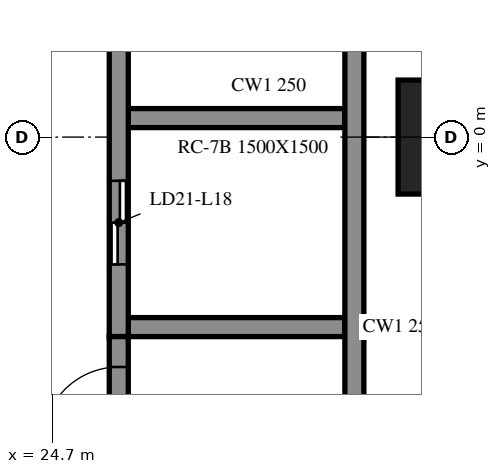
"""IFC4 building model, lengths in metres.
Left out: names, types, materials, properties, quantities, classifications, styles, units other than length and angle.
Written with IfcOpenShell. Run it as: python <this file> out.ifc"""

import sys

from ifc_helpers import new_model, si_unit, direction, frame, frame_2d, origin, origin_2d, place, context, subcontext, project, spatial, rectangle, extrude, element, fill, save


model = new_model("IFC4")
c1 = context("Model", 3, precision=1e-05, world=origin(), true_north=direction((0.0, 1.0)))
c2 = subcontext(c1, "Body", "Model", "MODEL_VIEW")
j1 = project(units=[si_unit("LENGTHUNIT", "METRE"), si_unit("PLANEANGLEUNIT", "RADIAN")], contexts=[c1])
p1 = place(None, origin())
s1 = spatial("IfcSite", under=j1, at=p1, CompositionType="ELEMENT")
p2 = place(p1, origin())
s2 = spatial("IfcBuilding", under=s1, at=p2, CompositionType="ELEMENT")
p3 = place(p2, frame((0.0, 0.0, 80.4)))
s3 = spatial("IfcBuildingStorey", under=s2, at=p3, CompositionType="ELEMENT", Elevation=80.4)
p4 = place(p3, frame((30.0, 0.0, -0.55), z_axis=(0.0, 0.0, 1.0), x_axis=(1.0, 0.0, 0.0)))
e1 = element("IfcColumn", 1, at=p4, inside=s3, PredefinedType="COLUMN", context=c2, shape_type="SweptSolid", body=[
    extrude(rectangle(XDim=1.5, YDim=1.5, at=origin_2d()), origin(), (0.0, 0.0, 1.0), 4.61),
])
p5 = place(p3, frame((28.675, -9.125, 0.0), z_axis=(0.0, 0.0, 1.0), x_axis=(0.0, 1.0, 0.0)))
e2 = element("IfcWall", 2, at=p5, inside=s3, PredefinedType="SOLIDWALL", context=c2, shape_type="SweptSolid", body=[
    extrude(rectangle(XDim=24.25, YDim=0.25, at=frame_2d((12.125, 0.0))), origin(), (0.0, 0.0, 1.0), 4.06),
])
p6 = place(p5, frame((14.425, 0.0, 0.0)))
e3 = element("IfcOpeningElement", 3, at=p6, cuts=e2, PredefinedType="OPENING", context=c2, shape_type="SweptSolid", body=[
    extrude(rectangle(XDim=0.9, YDim=2.1, at=frame_2d((0.45, 1.05))), frame((0.0, 0.135, 0.0), z_axis=(0.0, -1.0, 0.0), x_axis=(1.0, 0.0, 0.0)), (0.0, 0.0, 1.0), 0.27),
])
p7 = place(p5, frame((18.975, 0.0, 0.0)))
e4 = element("IfcOpeningElement", 4, at=p7, cuts=e2, PredefinedType="OPENING", context=c2, shape_type="SweptSolid", body=[
    extrude(rectangle(XDim=0.9, YDim=2.1, at=frame_2d((0.45, 1.05))), frame((0.0, 0.135, 0.0), z_axis=(0.0, -1.0, 0.0), x_axis=(1.0, 0.0, 0.0)), (0.0, 0.0, 1.0), 0.27),
])
p8 = place(p5, frame((21.396, 0.0, 0.0)))
e5 = element("IfcOpeningElement", 5, at=p8, cuts=e2, PredefinedType="OPENING", context=c2, shape_type="SweptSolid", body=[
    extrude(rectangle(XDim=0.9, YDim=2.1, at=frame_2d((0.45, 1.05))), frame((0.0, 0.135, 0.0), z_axis=(0.0, -1.0, 0.0), x_axis=(1.0, 0.0, 0.0)), (0.0, 0.0, 1.0), 0.27),
])
p9 = place(p3, frame((25.575, -8.875, 0.0), z_axis=(0.0, 0.0, 1.0), x_axis=(0.0, 1.0, 0.0)))
e6 = element("IfcWall", 6, at=p9, inside=s3, PredefinedType="SOLIDWALL", context=c2, shape_type="SweptSolid", body=[
    extrude(rectangle(XDim=6.25, YDim=0.25, at=frame_2d((3.125, 0.0))), origin(), (0.0, 0.0, 1.0), 4.06),
])
p10 = place(p9, frame((4.85, 0.0, 0.0)))
e7 = element("IfcOpeningElement", 7, at=p10, cuts=e6, PredefinedType="OPENING", context=c2, shape_type="SweptSolid", body=[
    extrude(rectangle(XDim=1.0, YDim=2.1, at=frame_2d((0.5, 1.05))), frame((0.0, 0.135, 0.0), z_axis=(0.0, -1.0, 0.0), x_axis=(1.0, 0.0, 0.0)), (0.0, 0.0, 1.0), 0.27),
])
p11 = place(p3, frame((25.575, 14.875, 0.0), z_axis=(0.0, 0.0, 1.0), x_axis=(0.0, -1.0, 0.0)))
e8 = element("IfcWall", 8, at=p11, inside=s3, PredefinedType="SOLIDWALL", context=c2, shape_type="SweptSolid", body=[
    extrude(rectangle(XDim=17.5, YDim=0.25, at=frame_2d((8.75, 0.0))), origin(), (0.0, 0.0, 1.0), 4.06),
])
p12 = place(p11, frame((15.45, 0.0, 0.0)))
e9 = element("IfcOpeningElement", 9, at=p12, cuts=e8, PredefinedType="OPENING", context=c2, shape_type="SweptSolid", body=[
    extrude(rectangle(XDim=1.1, YDim=2.1, at=frame_2d((0.55, 1.05))), frame((0.0, 0.135, 0.0), z_axis=(0.0, -1.0, 0.0), x_axis=(1.0, 0.0, 0.0)), (0.0, 0.0, 1.0), 0.27),
])
p13 = place(p11, frame((12.8, 0.0, 0.0)))
e10 = element("IfcOpeningElement", 10, at=p13, cuts=e8, PredefinedType="OPENING", context=c2, shape_type="SweptSolid", body=[
    extrude(rectangle(XDim=0.9, YDim=2.1, at=frame_2d((0.45, 1.05))), frame((0.0, 0.135, 0.0), z_axis=(0.0, -1.0, 0.0), x_axis=(1.0, 0.0, 0.0)), (0.0, 0.0, 1.0), 0.27),
])
for number, where, z_axis, x_axis in (
    (11, (25.7, -2.5, 0.0), (0.0, 0.0, 1.0), (1.0, 0.0, 0.0)),
    (12, (25.7, 0.25, 0.0), (0.0, 0.0, 1.0), (1.0, 0.0, 0.0)),
):
    element("IfcWall", number, at=place(p3, frame(where, z_axis=z_axis, x_axis=x_axis)), inside=s3, PredefinedType="SOLIDWALL", context=c2, shape_type="SweptSolid", body=[
        extrude(rectangle(XDim=2.85, YDim=0.25, at=frame_2d((1.425, 0.0))), origin(), (0.0, 0.0, 1.0), 4.06),
    ])
p14 = place(p12, origin())
e13 = element("IfcDoor", 13, at=p14, inside=s3, OperationType="DOUBLE_DOOR_SLIDING", PredefinedType="DOOR", context=c2, shape_type="SweptSolid", body=[
    extrude(rectangle(XDim=1.1, YDim=2.1, at=frame_2d((0.55, 1.05))), frame((0.0, 0.025, 0.0), z_axis=(0.0, -1.0, 0.0), x_axis=(1.0, 0.0, 0.0)), (0.0, 0.0, 1.0), 0.05),
])
fill(e9, e13)
p15 = place(p10, origin())
e14 = element("IfcDoor", 14, at=p15, inside=s3, OperationType="SINGLE_SWING_RIGHT", PredefinedType="DOOR", context=c2, shape_type="SweptSolid", body=[
    extrude(rectangle(XDim=1.0, YDim=2.1, at=frame_2d((0.5, 1.05))), frame((0.0, 0.025, 0.0), z_axis=(0.0, -1.0, 0.0), x_axis=(1.0, 0.0, 0.0)), (0.0, 0.0, 1.0), 0.05),
])
fill(e7, e14)
save(model, sys.argv[1])
